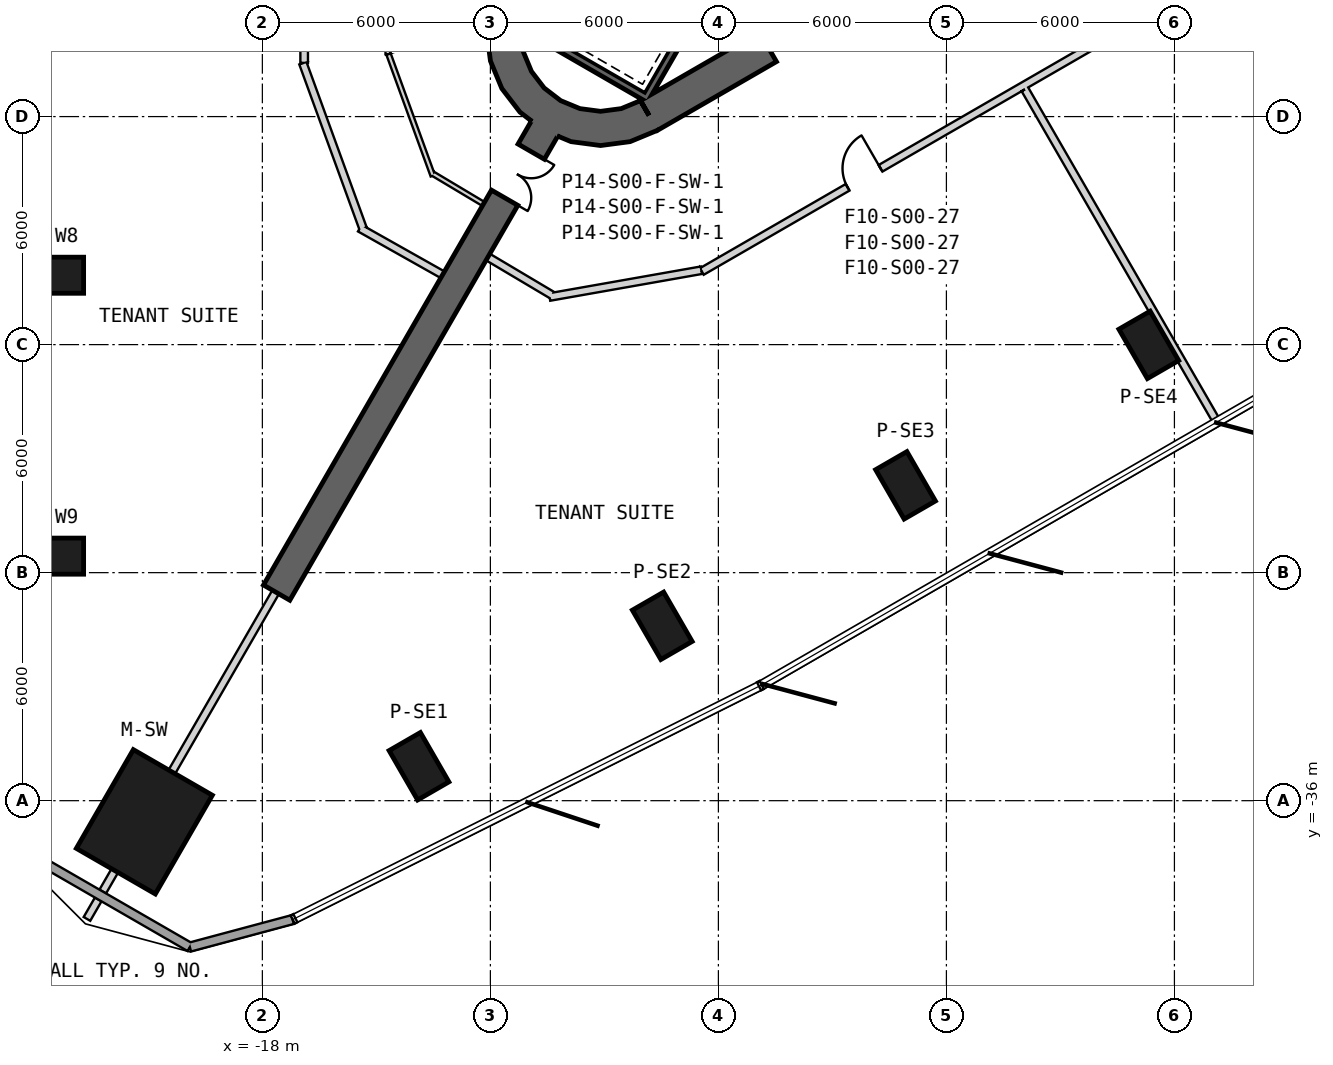
"""IFC4 building model, lengths in metres.
Left out: names, types, materials, properties, quantities, classifications, styles, units other than length and angle.
Written with IfcOpenShell. Run it as: python <this file> out.ifc"""

import sys

from ifc_helpers import new_model, si_unit, direction, frame, frame_2d, origin, origin_2d, place, context, subcontext, project, spatial, polyline, rectangle, outline, extrude, element, fill, save


model = new_model("IFC4")
c1 = context("Model", 3, precision=1e-05, world=origin(), true_north=direction((0.0, 1.0)))
c2 = subcontext(c1, "Body", "Model", "MODEL_VIEW")
j1 = project(units=[si_unit("LENGTHUNIT", "METRE"), si_unit("PLANEANGLEUNIT", "RADIAN")], contexts=[c1])
p1 = place(None, origin())
s1 = spatial("IfcSite", under=j1, at=p1, CompositionType="ELEMENT")
p2 = place(p1, origin())
s2 = spatial("IfcBuilding", under=s1, at=p2, CompositionType="ELEMENT")
p3 = place(p2, frame((0.0, 0.0, 45.5)))
s3 = spatial("IfcBuildingStorey", under=s2, at=p3, CompositionType="ELEMENT", Elevation=45.5)
p4 = place(p3, frame((-21.106, -36.556, 0.0), z_axis=(0.0, 0.0, 1.0), x_axis=(-0.5, -0.866025403784, 0.0)))
e1 = element("IfcColumn", 1, at=p4, inside=s3, PredefinedType="COLUMN", context=c2, shape_type="SweptSolid", body=[
    extrude(rectangle(XDim=3.0, YDim=2.4, at=origin_2d()), origin(), (0.0, 0.0, 1.0), 4.1),
])
for number, where, z_axis, x_axis in (
    (2, (-23.453, -22.174, 0.0), (0.0, 0.0, 1.0), (-1.0, 0.0, 0.0)),
    (3, (-23.453, -29.566, 0.0), (0.0, 0.0, 1.0), (-1.0, 0.0, 0.0)),
    (4, (-13.878, -35.094, 0.0), (0.0, 0.0, 1.0), (0.5, -0.866, 0.0)),
    (5, (-7.477, -31.398, 0.0), (0.0, 0.0, 1.0), (0.5, -0.866, 0.0)),
):
    element("IfcColumn", number, at=place(p3, frame(where, z_axis=z_axis, x_axis=x_axis)), inside=s3, PredefinedType="COLUMN", context=c2, shape_type="SweptSolid", body=[
        extrude(rectangle(XDim=1.5, YDim=0.95, at=origin_2d()), origin(), (0.0, 0.0, 1.0), 4.1),
    ])
for number, where, z_axis, x_axis in (
    (6, (-1.076, -27.703, -0.3), (0.0, 0.0, 1.0), (0.5, -0.866, 0.0)),
    (7, (5.325, -24.007, -0.3), (0.0, 0.0, 1.0), (0.5, -0.866, 0.0)),
):
    element("IfcColumn", number, at=place(p3, frame(where, z_axis=z_axis, x_axis=x_axis)), inside=s3, PredefinedType="COLUMN", context=c2, shape_type="SweptSolid", body=[
        extrude(rectangle(XDim=1.5, YDim=0.95, at=origin_2d()), origin(), (0.0, 0.0, 1.0), 4.4),
    ])
p5 = place(p3, frame((-7.825, -17.97, 0.0), z_axis=(0.0, 0.0, 1.0), x_axis=(0.866028369851, 0.499994862586, 0.0)))
e8 = element("IfcWall", 8, at=p5, inside=s3, PredefinedType="SHEAR", context=c2, shape_type="SweptSolid", body=[
    extrude(rectangle(XDim=31.523, YDim=0.9, at=frame_2d((15.762, 0.0))), origin(), (0.0, 0.0, 1.0), 4.1),
])
p6 = place(p5, frame((7.062, 0.0, 0.0)))
e9 = element("IfcOpeningElement", 9, at=p6, cuts=e8, PredefinedType="OPENING", context=c2, shape_type="SweptSolid", body=[
    extrude(rectangle(XDim=1.2, YDim=2.4, at=frame_2d((0.6, 1.2))), frame((0.0, 0.46, 0.0), z_axis=(0.0, -1.0, 0.0), x_axis=(1.0, 0.0, 0.0)), (0.0, 0.0, 1.0), 0.92),
])
p7 = place(p5, frame((9.762, 0.0, 0.0)))
e10 = element("IfcOpeningElement", 10, at=p7, cuts=e8, PredefinedType="OPENING", context=c2, shape_type="SweptSolid", body=[
    extrude(rectangle(XDim=1.2, YDim=2.4, at=frame_2d((0.6, 1.2))), frame((0.0, 0.46, 0.0), z_axis=(0.0, -1.0, 0.0), x_axis=(1.0, 0.0, 0.0)), (0.0, 0.0, 1.0), 0.92),
])
p8 = place(p5, frame((12.462, 0.0, 0.0)))
e11 = element("IfcOpeningElement", 11, at=p8, cuts=e8, PredefinedType="OPENING", context=c2, shape_type="SweptSolid", body=[
    extrude(rectangle(XDim=1.2, YDim=2.4, at=frame_2d((0.6, 1.2))), frame((0.0, 0.46, 0.0), z_axis=(0.0, -1.0, 0.0), x_axis=(1.0, 0.0, 0.0)), (0.0, 0.0, 1.0), 0.92),
])
p9 = place(p5, frame((15.162, 0.0, 0.0)))
e12 = element("IfcOpeningElement", 12, at=p9, cuts=e8, PredefinedType="OPENING", context=c2, shape_type="SweptSolid", body=[
    extrude(rectangle(XDim=1.2, YDim=2.4, at=frame_2d((0.6, 1.2))), frame((0.0, 0.46, 0.0), z_axis=(0.0, -1.0, 0.0), x_axis=(1.0, 0.0, 0.0)), (0.0, 0.0, 1.0), 0.92),
])
p10 = place(p5, frame((17.862, 0.0, 0.0)))
e13 = element("IfcOpeningElement", 13, at=p10, cuts=e8, PredefinedType="OPENING", context=c2, shape_type="SweptSolid", body=[
    extrude(rectangle(XDim=1.2, YDim=2.4, at=frame_2d((0.6, 1.2))), frame((0.0, 0.46, 0.0), z_axis=(0.0, -1.0, 0.0), x_axis=(1.0, 0.0, 0.0)), (0.0, 0.0, 1.0), 0.92),
])
p11 = place(p5, frame((20.562, 0.0, 0.0)))
e14 = element("IfcOpeningElement", 14, at=p11, cuts=e8, PredefinedType="OPENING", context=c2, shape_type="SweptSolid", body=[
    extrude(rectangle(XDim=1.2, YDim=2.4, at=frame_2d((0.6, 1.2))), frame((0.0, 0.46, 0.0), z_axis=(0.0, -1.0, 0.0), x_axis=(1.0, 0.0, 0.0)), (0.0, 0.0, 1.0), 0.92),
])
p12 = place(p5, frame((26.712, 0.0, 0.0)))
e15 = element("IfcOpeningElement", 15, at=p12, cuts=e8, PredefinedType="OPENING", context=c2, shape_type="SweptSolid", body=[
    extrude(rectangle(XDim=1.2, YDim=2.4, at=frame_2d((0.6, 1.2))), frame((0.0, 0.46, 0.0), z_axis=(0.0, -1.0, 0.0), x_axis=(1.0, 0.0, 0.0)), (0.0, 0.0, 1.0), 0.92),
])
p13 = place(p5, frame((3.612, 0.0, 0.0)))
e16 = element("IfcOpeningElement", 16, at=p13, cuts=e8, PredefinedType="OPENING", context=c2, shape_type="SweptSolid", body=[
    extrude(rectangle(XDim=1.2, YDim=2.4, at=frame_2d((0.6, 1.2))), frame((0.0, 0.46, 0.0), z_axis=(0.0, -1.0, 0.0), x_axis=(1.0, 0.0, 0.0)), (0.0, 0.0, 1.0), 0.92),
])
p14 = place(p3, origin())
e17 = element("IfcWall", 17, at=p14, inside=s3, PredefinedType="SHEAR", context=c2, shape_type="SweptSolid", body=[
    extrude(outline(polyline([(-12.1, -15.762), (-11.998, -16.538), (-11.698, -17.262), (-11.221, -17.883), (-10.6, -18.36), (-9.876, -18.659), (-9.1, -18.762), (-8.323, -18.659), (-7.6, -18.36), (-8.05, -17.58), (-8.556, -17.79), (-9.1, -17.862), (-9.644, -17.79), (-10.15, -17.58), (-10.585, -17.247), (-10.919, -16.812), (-11.128, -16.305), (-11.2, -15.762), (-12.1, -15.762)])), origin(), (0.0, 0.0, 1.0), 4.1),
])
p15 = place(p3, frame((-10.575, -18.316, 0.0), z_axis=(0.0, 0.0, 1.0), x_axis=(-0.499996272984, -0.866027555568, 0.0)))
e18 = element("IfcWall", 18, at=p15, inside=s3, PredefinedType="SHEAR", context=c2, shape_type="SweptSolid", body=[
    extrude(rectangle(XDim=14.098, YDim=0.8, at=frame_2d((7.049, 0.0))), origin(), (0.0, 0.0, 1.0), 4.1),
])
p16 = place(p15, frame((0.7, 0.0, 0.0)))
e19 = element("IfcOpeningElement", 19, at=p16, cuts=e18, PredefinedType="OPENING", context=c2, shape_type="SweptSolid", body=[
    extrude(rectangle(XDim=1.4, YDim=2.4, at=frame_2d((0.7, 1.2))), frame((0.0, 0.41, 0.0), z_axis=(0.0, -1.0, 0.0), x_axis=(1.0, 0.0, 0.0)), (0.0, 0.0, 1.0), 0.82),
])
p17 = place(p3, frame((-24.56, -37.167, 0.0), z_axis=(0.0, 0.0, 1.0), x_axis=(0.866010734295, -0.500025407441, 0.0)))
e20 = element("IfcWall", 20, at=p17, inside=s3, PredefinedType="SOLIDWALL", context=c2, shape_type="SweptSolid", body=[
    extrude(rectangle(XDim=5.371, YDim=0.24, at=frame_2d((2.686, 0.0))), origin(), (0.0, 0.0, 1.0), 3.8),
])
p18 = place(p3, frame((-19.908, -39.853, 0.0), z_axis=(0.0, 0.0, 1.0), x_axis=(0.965923146675, 0.25882904535, 0.0)))
e21 = element("IfcWall", 21, at=p18, inside=s3, PredefinedType="SOLIDWALL", context=c2, shape_type="SweptSolid", body=[
    extrude(rectangle(XDim=2.801, YDim=0.24, at=frame_2d((1.4, 0.0))), origin(), (0.0, 0.0, 1.0), 3.8),
])
p19 = place(p3, frame((-3.905, -10.563, -0.3), z_axis=(0.0, 0.0, 1.0), x_axis=(-0.500012932018, -0.866017937352, 0.0)))
e22 = element("IfcWall", 22, at=p19, inside=s3, PredefinedType="SHEAR", context=c2, shape_type="SweptSolid", body=[
    extrude(rectangle(XDim=8.1, YDim=0.2, at=frame_2d((4.05, 0.0))), origin(), (0.0, 0.0, 1.0), 4.1),
])
p20 = place(p3, frame((-11.282, -15.541, -0.3), z_axis=(0.0, 0.0, 1.0), x_axis=(0.866000483506, -0.500043160704, 0.0)))
e23 = element("IfcWall", 23, at=p20, inside=s3, PredefinedType="SHEAR", context=c2, shape_type="SweptSolid", body=[
    extrude(rectangle(XDim=3.8, YDim=0.2, at=frame_2d((1.9, 0.0))), origin(), (0.0, 0.0, 1.0), 4.1),
])
p21 = place(p3, frame((-14.7, 16.24, 0.0), z_axis=(0.0, 0.0, 1.0), x_axis=(0.0, -1.0, 0.0)))
e24 = element("IfcWall", 24, at=p21, inside=s3, PredefinedType="PARTITIONING", context=c2, shape_type="SweptSolid", body=[
    extrude(rectangle(XDim=32.599, YDim=0.12, at=frame_2d((16.299, 0.0))), origin(), (0.0, 0.0, 1.0), 2.98),
])
p22 = place(p21, frame((15.77, 0.0, 0.0)))
e25 = element("IfcOpeningElement", 25, at=p22, cuts=e24, PredefinedType="OPENING", context=c2, shape_type="SweptSolid", body=[
    extrude(rectangle(XDim=1.0, YDim=2.1, at=frame_2d((0.5, 1.05))), frame((0.0, 0.07, 0.0), z_axis=(0.0, -1.0, 0.0), x_axis=(1.0, 0.0, 0.0)), (0.0, 0.0, 1.0), 0.14),
])
p23 = place(p3, frame((-14.679, -16.356, 0.0), z_axis=(0.0, 0.0, 1.0), x_axis=(0.342002052592, -0.939699205077, 0.0)))
e26 = element("IfcWall", 26, at=p23, inside=s3, PredefinedType="PARTITIONING", context=c2, shape_type="SweptSolid", body=[
    extrude(rectangle(XDim=3.406, YDim=0.12, at=frame_2d((1.703, 0.0))), origin(), (0.0, 0.0, 1.0), 2.88),
])
p24 = place(p3, frame((-13.516, -19.501, 0.0), z_axis=(0.0, 0.0, 1.0), x_axis=(0.858336816023, -0.513086649856, 0.0)))
e27 = element("IfcWall", 27, at=p24, inside=s3, PredefinedType="PARTITIONING", context=c2, shape_type="SweptSolid", body=[
    extrude(rectangle(XDim=1.555, YDim=0.12, at=frame_2d((0.777, 0.0))), origin(), (0.0, 0.0, 1.0), 3.8),
])
p25 = place(p3, frame((-15.435, -20.935, 0.0), z_axis=(0.0, 0.0, 1.0), x_axis=(0.871392892797, -0.490585799206, 0.0)))
e28 = element("IfcWall", 28, at=p25, inside=s3, PredefinedType="PARTITIONING", context=c2, shape_type="SweptSolid", body=[
    extrude(rectangle(XDim=2.5, YDim=0.2, at=frame_2d((1.25, 0.0))), origin(), (0.0, 0.0, 1.0), 3.8),
])
p26 = place(p3, frame((-16.934, -16.594, 0.0), z_axis=(0.0, 0.0, 1.0), x_axis=(0.342009657388, -0.939696437289, 0.0)))
e29 = element("IfcWall", 29, at=p26, inside=s3, PredefinedType="PARTITIONING", context=c2, shape_type="SweptSolid", body=[
    extrude(rectangle(XDim=4.632, YDim=0.2, at=frame_2d((2.316, 0.0))), origin(), (0.0, 0.0, 1.0), 2.88),
])
p27 = place(p3, frame((-16.9, 16.787, 0.0), z_axis=(0.0, 0.0, 1.0), x_axis=(0.0, -1.0, 0.0)))
e30 = element("IfcWall", 30, at=p27, inside=s3, PredefinedType="PARTITIONING", context=c2, shape_type="SweptSolid", body=[
    extrude(rectangle(XDim=33.375, YDim=0.2, at=frame_2d((16.688, 0.0))), origin(), (0.0, 0.0, 1.0), 2.98),
])
p28 = place(p27, frame((28.067, 0.0, 0.0)))
e31 = element("IfcOpeningElement", 31, at=p28, cuts=e30, PredefinedType="OPENING", context=c2, shape_type="SweptSolid", body=[
    extrude(rectangle(XDim=1.0, YDim=2.1, at=frame_2d((0.5, 1.05))), frame((0.0, 0.11, 0.0), z_axis=(0.0, -1.0, 0.0), x_axis=(1.0, 0.0, 0.0)), (0.0, 0.0, 1.0), 0.22),
])
p29 = place(p27, frame((16.347, 0.0, 0.0)))
e32 = element("IfcOpeningElement", 32, at=p29, cuts=e30, PredefinedType="OPENING", context=c2, shape_type="SweptSolid", body=[
    extrude(rectangle(XDim=1.0, YDim=2.1, at=frame_2d((0.5, 1.05))), frame((0.0, 0.11, 0.0), z_axis=(0.0, -1.0, 0.0), x_axis=(1.0, 0.0, 0.0)), (0.0, 0.0, 1.0), 0.22),
])
p30 = place(p27, frame((4.518, 0.0, 0.0)))
e33 = element("IfcOpeningElement", 33, at=p30, cuts=e30, PredefinedType="OPENING", context=c2, shape_type="SweptSolid", body=[
    extrude(rectangle(XDim=1.0, YDim=2.1, at=frame_2d((0.5, 1.05))), frame((0.0, 0.11, 0.0), z_axis=(0.0, -1.0, 0.0), x_axis=(1.0, 0.0, 0.0)), (0.0, 0.0, 1.0), 0.22),
])
p31 = place(p3, frame((-6.436, -22.075, 0.0), z_axis=(0.0, 0.0, 1.0), x_axis=(0.866022453651, 0.500005109747, 0.0)))
e34 = element("IfcWall", 34, at=p31, inside=s3, PredefinedType="PARTITIONING", context=c2, shape_type="SweptSolid", body=[
    extrude(rectangle(XDim=33.022, YDim=0.2, at=frame_2d((16.511, 0.0))), origin(), (0.0, 0.0, 1.0), 2.98),
])
p32 = place(p31, frame((20.89, 0.0, 0.0)))
e35 = element("IfcOpeningElement", 35, at=p32, cuts=e34, PredefinedType="OPENING", context=c2, shape_type="SweptSolid", body=[
    extrude(rectangle(XDim=1.0, YDim=2.1, at=frame_2d((0.5, 1.05))), frame((0.0, 0.11, 0.0), z_axis=(0.0, -1.0, 0.0), x_axis=(1.0, 0.0, 0.0)), (0.0, 0.0, 1.0), 0.22),
])
p33 = place(p31, frame((4.429, 0.0, 0.0)))
e36 = element("IfcOpeningElement", 36, at=p33, cuts=e34, PredefinedType="OPENING", context=c2, shape_type="SweptSolid", body=[
    extrude(rectangle(XDim=1.0, YDim=2.1, at=frame_2d((0.5, 1.05))), frame((0.0, 0.11, 0.0), z_axis=(0.0, -1.0, 0.0), x_axis=(1.0, 0.0, 0.0)), (0.0, 0.0, 1.0), 0.22),
])
p34 = place(p3, frame((-10.443, -22.747, 0.0), z_axis=(0.0, 0.0, 1.0), x_axis=(0.984812020794, 0.173623972133, 0.0)))
e37 = element("IfcWall", 37, at=p34, inside=s3, PredefinedType="PARTITIONING", context=c2, shape_type="SweptSolid", body=[
    extrude(rectangle(XDim=4.057, YDim=0.2, at=frame_2d((2.028, 0.0))), origin(), (0.0, 0.0, 1.0), 2.88),
])
p35 = place(p3, frame((-12.064, -21.696, 0.0), z_axis=(0.0, 0.0, 1.0), x_axis=(0.859769731383, -0.510681905885, 0.0)))
e38 = element("IfcWall", 38, at=p35, inside=s3, PredefinedType="PARTITIONING", context=c2, shape_type="SweptSolid", body=[
    extrude(rectangle(XDim=1.97, YDim=0.2, at=frame_2d((0.985, 0.0))), origin(), (0.0, 0.0, 1.0), 3.8),
])
p36 = place(p3, frame((-17.65, -30.511, 0.0), z_axis=(0.0, 0.0, 1.0), x_axis=(-0.499984217882, -0.866034515403, 0.0)))
e39 = element("IfcWall", 39, at=p36, inside=s3, PredefinedType="PARTITIONING", context=c2, shape_type="SweptSolid", body=[
    extrude(rectangle(XDim=5.463, YDim=0.2, at=frame_2d((2.731, 0.0))), origin(), (0.0, 0.0, 1.0), 3.37),
])
p37 = place(p3, frame((-21.882, -37.84, 0.0), z_axis=(0.0, 0.0, 1.0), x_axis=(-0.499977104415, -0.866038622153, 0.0)))
e40 = element("IfcWall", 40, at=p37, inside=s3, PredefinedType="PARTITIONING", context=c2, shape_type="SweptSolid", body=[
    extrude(rectangle(XDim=0.636, YDim=0.2, at=frame_2d((0.318, 0.0))), origin(), (0.0, 0.0, 1.0), 3.8),
])
p38 = place(p3, frame((-22.32, -38.599, 0.0), z_axis=(0.0, 0.0, 1.0), x_axis=(-0.500222587251, -0.865896854829, 0.0)))
e41 = element("IfcWall", 41, at=p38, inside=s3, PredefinedType="PARTITIONING", context=c2, shape_type="SweptSolid", body=[
    extrude(rectangle(XDim=0.592, YDim=0.2, at=frame_2d((0.296, 0.0))), origin(), (0.0, 0.0, 1.0), 3.8),
])
p39 = place(p3, frame((2.066, -17.283, 0.0), z_axis=(0.0, 0.0, 1.0), x_axis=(0.5000534592, -0.865994536901, 0.0)))
e42 = element("IfcWall", 42, at=p39, inside=s3, PredefinedType="PARTITIONING", context=c2, shape_type="SweptSolid", body=[
    extrude(rectangle(XDim=10.109, YDim=0.2, at=frame_2d((5.054, 0.0))), origin(), (0.0, 0.0, 1.0), 3.08),
])
p40 = place(p33, origin())
e43 = element("IfcDoor", 43, at=p40, inside=s3, OperationType="SINGLE_SWING_RIGHT", PredefinedType="USERDEFINED", context=c2, shape_type="SweptSolid", body=[
    extrude(rectangle(XDim=1.0, YDim=2.1, at=frame_2d((0.5, 1.05))), frame((0.0, 0.025, 0.0), z_axis=(0.0, -1.0, 0.0), x_axis=(1.0, 0.0, 0.0)), (0.0, 0.0, 1.0), 0.05),
])
fill(e36, e43)
p41 = place(p16, origin())
e44 = element("IfcDoor", 44, at=p41, inside=s3, OperationType="DOUBLE_DOOR_SINGLE_SWING", PredefinedType="NOTDEFINED", context=c2, shape_type="SweptSolid", body=[
    extrude(rectangle(XDim=1.4, YDim=2.4, at=frame_2d((0.7, 1.2))), frame((0.0, 0.025, 0.0), z_axis=(0.0, -1.0, 0.0), x_axis=(1.0, 0.0, 0.0)), (0.0, 0.0, 1.0), 0.05),
])
fill(e19, e44)
save(model, sys.argv[1])
